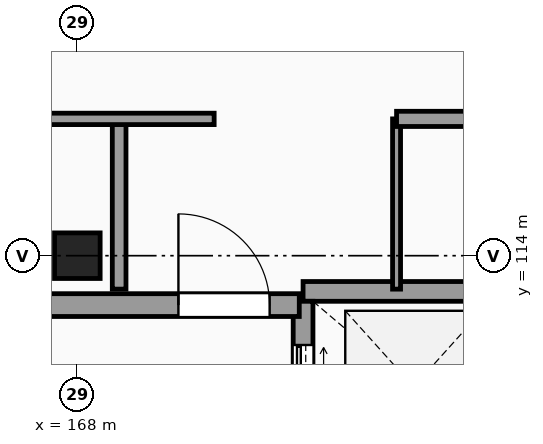
"""IFC4 building model, lengths in metres.
Left out: names, types, materials, properties, quantities, classifications, styles, units other than length and angle.
Written with IfcOpenShell. Run it as: python <this file> out.ifc"""

import sys

from ifc_helpers import new_model, si_unit, direction, frame, frame_2d, origin, origin_2d, place, context, subcontext, project, spatial, rectangle, extrude, element, fill, save


model = new_model("IFC4")
c1 = context("Model", 3, precision=1e-05, world=origin(), true_north=direction((0.0, 1.0)))
c2 = subcontext(c1, "Body", "Model", "MODEL_VIEW")
j1 = project(units=[si_unit("LENGTHUNIT", "METRE"), si_unit("PLANEANGLEUNIT", "RADIAN")], contexts=[c1])
p1 = place(None, origin())
s1 = spatial("IfcSite", under=j1, at=p1, CompositionType="ELEMENT")
p2 = place(p1, origin())
s2 = spatial("IfcBuilding", under=s1, at=p2, CompositionType="ELEMENT")
p3 = place(p2, frame((0.0, 0.0, 31.5)))
s3 = spatial("IfcBuildingStorey", under=s2, at=p3, CompositionType="ELEMENT", Elevation=31.5)
p4 = place(p3, frame((168.0, 114.0, 0.0), z_axis=(0.0, 0.0, 1.0), x_axis=(1.0, 0.0, 0.0)))
e1 = element("IfcColumn", 1, at=p4, inside=s3, PredefinedType="COLUMN", context=c2, shape_type="SweptSolid", body=[
    extrude(rectangle(XDim=0.6, YDim=0.6, at=origin_2d()), origin(), (0.0, 0.0, 1.0), 3.3),
])
p5 = place(p3, frame((170.97, 113.53, 0.0), z_axis=(0.0, 0.0, 1.0), x_axis=(1.0, 0.0, 0.0)))
e2 = element("IfcWall", 2, at=p5, inside=s3, PredefinedType="SHEAR", context=c2, shape_type="SweptSolid", body=[
    extrude(rectangle(XDim=2.91, YDim=0.26, at=frame_2d((1.455, 0.0))), origin(), (0.0, 0.0, 1.0), 3.3),
])
p6 = place(p3, frame((170.97, 111.15, 0.0), z_axis=(0.0, 0.0, 1.0), x_axis=(0.0, 1.0, 0.0)))
e3 = element("IfcWall", 3, at=p6, inside=s3, PredefinedType="SHEAR", context=c2, shape_type="SweptSolid", body=[
    extrude(rectangle(XDim=2.25, YDim=0.26, at=frame_2d((1.125, 0.0))), origin(), (0.0, 0.0, 1.0), 3.3),
])
p7 = place(p6, frame((0.575, 0.0, 0.0)))
e4 = element("IfcOpeningElement", 4, at=p7, cuts=e3, PredefinedType="OPENING", context=c2, shape_type="SweptSolid", body=[
    extrude(rectangle(XDim=1.1, YDim=2.2, at=frame_2d((0.55, 1.1))), frame((0.0, 0.14, 0.0), z_axis=(0.0, -1.0, 0.0), x_axis=(1.0, 0.0, 0.0)), (0.0, 0.0, 1.0), 0.28),
])
p8 = place(p3, frame((166.68, 113.35, 0.0), z_axis=(0.0, 0.0, 1.0), x_axis=(1.0, 0.0, 0.0)))
e5 = element("IfcWall", 5, at=p8, inside=s3, PredefinedType="SHEAR", context=c2, shape_type="SweptSolid", body=[
    extrude(rectangle(XDim=4.24, YDim=0.3, at=frame_2d((2.12, 0.0))), origin(), (0.0, 0.0, 1.0), 3.3),
])
p9 = place(p8, frame((2.65, 0.0, 0.0)))
e6 = element("IfcOpeningElement", 6, at=p9, cuts=e5, PredefinedType="OPENING", context=c2, shape_type="SweptSolid", body=[
    extrude(rectangle(XDim=1.2, YDim=2.2, at=frame_2d((0.6, 1.1))), frame((0.0, 0.16, 0.0), z_axis=(0.0, -1.0, 0.0), x_axis=(1.0, 0.0, 0.0)), (0.0, 0.0, 1.0), 0.32),
])
p10 = place(p3, frame((168.55, 113.56, 0.0), z_axis=(0.0, 0.0, 1.0), x_axis=(0.0, 1.0, 0.0)))
e7 = element("IfcWall", 7, at=p10, inside=s3, PredefinedType="PARTITIONING", context=c2, shape_type="SweptSolid", body=[
    extrude(rectangle(XDim=2.24, YDim=0.18, at=frame_2d((1.12, 0.0))), origin(), (0.0, 0.0, 1.0), 3.07),
])
p11 = place(p3, frame((172.2, 113.56, 0.0), z_axis=(0.0, 0.0, 1.0), x_axis=(0.0, 1.0, 0.0)))
e8 = element("IfcWall", 8, at=p11, inside=s3, PredefinedType="PARTITIONING", context=c2, shape_type="SweptSolid", body=[
    extrude(rectangle(XDim=2.24, YDim=0.105, at=frame_2d((1.12, 0.0))), origin(), (0.0, 0.0, 1.0), 3.07),
])
p12 = place(p3, frame((66.215, 115.8, 0.0), z_axis=(0.0, 0.0, 1.0), x_axis=(1.0, 0.0, 0.0)))
e9 = element("IfcWall", 9, at=p12, inside=s3, PredefinedType="PARTITIONING", context=c2, shape_type="SweptSolid", body=[
    extrude(rectangle(XDim=103.585, YDim=0.15, at=frame_2d((51.792, 0.0))), origin(), (0.0, 0.0, 1.0), 3.07),
])
p13 = place(p12, frame((80.185, 0.0, 0.0)))
e10 = element("IfcOpeningElement", 10, at=p13, cuts=e9, PredefinedType="OPENING", context=c2, shape_type="SweptSolid", body=[
    extrude(rectangle(XDim=1.2, YDim=2.2, at=frame_2d((0.6, 1.1))), frame((0.0, 0.085, 0.0), z_axis=(0.0, -1.0, 0.0), x_axis=(1.0, 0.0, 0.0)), (0.0, 0.0, 1.0), 0.17),
])
p14 = place(p12, frame((50.185, 0.0, 0.0)))
e11 = element("IfcOpeningElement", 11, at=p14, cuts=e9, PredefinedType="OPENING", context=c2, shape_type="SweptSolid", body=[
    extrude(rectangle(XDim=1.2, YDim=2.2, at=frame_2d((0.6, 1.1))), frame((0.0, 0.085, 0.0), z_axis=(0.0, -1.0, 0.0), x_axis=(1.0, 0.0, 0.0)), (0.0, 0.0, 1.0), 0.17),
])
p15 = place(p12, frame((9.035, 0.0, 0.0)))
e12 = element("IfcOpeningElement", 12, at=p15, cuts=e9, PredefinedType="OPENING", context=c2, shape_type="SweptSolid", body=[
    extrude(rectangle(XDim=1.1, YDim=2.15, at=frame_2d((0.55, 1.075))), frame((0.0, 0.085, 0.0), z_axis=(0.0, -1.0, 0.0), x_axis=(1.0, 0.0, 0.0)), (0.0, 0.0, 1.0), 0.17),
])
p16 = place(p12, frame((55.335, 0.0, 0.0)))
e13 = element("IfcOpeningElement", 13, at=p16, cuts=e9, PredefinedType="OPENING", context=c2, shape_type="SweptSolid", body=[
    extrude(rectangle(XDim=1.0, YDim=2.15, at=frame_2d((0.5, 1.075))), frame((0.0, 0.085, 0.0), z_axis=(0.0, -1.0, 0.0), x_axis=(1.0, 0.0, 0.0)), (0.0, 0.0, 1.0), 0.17),
])
p17 = place(p12, frame((62.305, 0.0, 0.0)))
e14 = element("IfcOpeningElement", 14, at=p17, cuts=e9, PredefinedType="OPENING", context=c2, shape_type="SweptSolid", body=[
    extrude(rectangle(XDim=0.96, YDim=2.15, at=frame_2d((0.48, 1.075))), frame((0.0, 0.085, 0.0), z_axis=(0.0, -1.0, 0.0), x_axis=(1.0, 0.0, 0.0)), (0.0, 0.0, 1.0), 0.17),
])
p18 = place(p12, frame((31.985, 0.0, 0.0)))
e15 = element("IfcOpeningElement", 15, at=p18, cuts=e9, PredefinedType="OPENING", context=c2, shape_type="SweptSolid", body=[
    extrude(rectangle(XDim=1.6, YDim=2.25, at=frame_2d((0.8, 1.125))), frame((0.0, 0.085, 0.0), z_axis=(0.0, -1.0, 0.0), x_axis=(1.0, 0.0, 0.0)), (0.0, 0.0, 1.0), 0.17),
])
p19 = place(p12, frame((18.61, 0.0, 0.0)))
e16 = element("IfcOpeningElement", 16, at=p19, cuts=e9, PredefinedType="OPENING", context=c2, shape_type="SweptSolid", body=[
    extrude(rectangle(XDim=0.95, YDim=2.1, at=frame_2d((0.475, 1.05))), frame((0.0, 0.085, 0.0), z_axis=(0.0, -1.0, 0.0), x_axis=(1.0, 0.0, 0.0)), (0.0, 0.0, 1.0), 0.17),
])
p20 = place(p12, frame((84.51, 0.0, 0.0)))
e17 = element("IfcOpeningElement", 17, at=p20, cuts=e9, PredefinedType="OPENING", context=c2, shape_type="SweptSolid", body=[
    extrude(rectangle(XDim=0.95, YDim=2.1, at=frame_2d((0.475, 1.05))), frame((0.0, 0.085, 0.0), z_axis=(0.0, -1.0, 0.0), x_axis=(1.0, 0.0, 0.0)), (0.0, 0.0, 1.0), 0.17),
])
p21 = place(p3, frame((172.2, 115.8, 0.0), z_axis=(0.0, 0.0, 1.0), x_axis=(1.0, 0.0, 0.0)))
e18 = element("IfcWall", 18, at=p21, inside=s3, PredefinedType="PARTITIONING", context=c2, shape_type="SweptSolid", body=[
    extrude(rectangle(XDim=4.3, YDim=0.2, at=frame_2d((2.15, 0.0))), origin(), (0.0, 0.0, 1.0), 3.07),
])
p22 = place(p21, frame((2.62, 0.0, 0.0)))
e19 = element("IfcOpeningElement", 19, at=p22, cuts=e18, PredefinedType="OPENING", context=c2, shape_type="SweptSolid", body=[
    extrude(rectangle(XDim=0.96, YDim=2.15, at=frame_2d((0.48, 1.075))), frame((0.0, 0.11, 0.0), z_axis=(0.0, -1.0, 0.0), x_axis=(1.0, 0.0, 0.0)), (0.0, 0.0, 1.0), 0.22),
])
p23 = place(p7, origin())
e20 = element("IfcDoor", 20, at=p23, inside=s3, OperationType="DOUBLE_DOOR_SLIDING", PredefinedType="DOOR", context=c2, shape_type="SweptSolid", body=[
    extrude(rectangle(XDim=1.1, YDim=2.2, at=frame_2d((0.55, 1.1))), frame((0.0, 0.025, 0.0), z_axis=(0.0, -1.0, 0.0), x_axis=(1.0, 0.0, 0.0)), (0.0, 0.0, 1.0), 0.05),
])
fill(e4, e20)
p24 = place(p9, origin())
e21 = element("IfcDoor", 21, at=p24, inside=s3, OperationType="SINGLE_SWING_LEFT", PredefinedType="DOOR", context=c2, shape_type="SweptSolid", body=[
    extrude(rectangle(XDim=1.2, YDim=2.2, at=frame_2d((0.6, 1.1))), frame((0.0, 0.025, 0.0), z_axis=(0.0, -1.0, 0.0), x_axis=(1.0, 0.0, 0.0)), (0.0, 0.0, 1.0), 0.05),
])
fill(e6, e21)
save(model, sys.argv[1])
